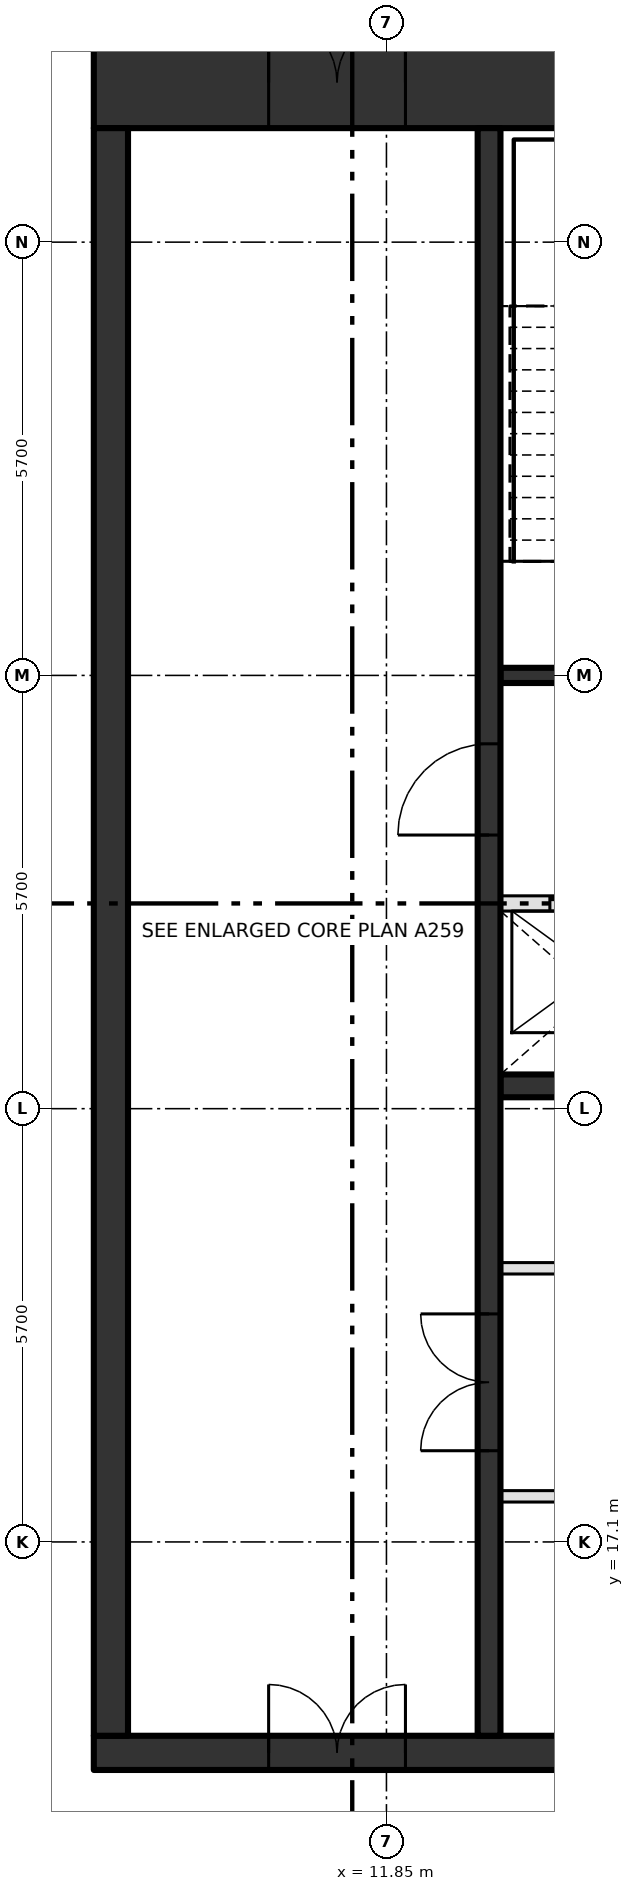
"""IFC4 building model, lengths in metres.
Left out: names, types, materials, properties, quantities, classifications, styles, units other than length and angle.
Written with IfcOpenShell. Run it as: python <this file> out.ifc"""

import sys

from ifc_helpers import new_model, si_unit, direction, frame, frame_2d, origin, place, context, subcontext, project, spatial, rectangle, extrude, element, fill, save


model = new_model("IFC4")
c1 = context("Model", 3, precision=1e-05, world=origin(), true_north=direction((0.0, 1.0)))
c2 = subcontext(c1, "Body", "Model", "MODEL_VIEW")
j1 = project(units=[si_unit("LENGTHUNIT", "METRE"), si_unit("PLANEANGLEUNIT", "RADIAN")], contexts=[c1])
p1 = place(None, origin())
s1 = spatial("IfcSite", under=j1, at=p1, CompositionType="ELEMENT")
p2 = place(p1, origin())
s2 = spatial("IfcBuilding", under=s1, at=p2, CompositionType="ELEMENT")
p3 = place(p2, frame((0.0, 0.0, 424.2)))
s3 = spatial("IfcBuildingStorey", under=s2, at=p3, CompositionType="ELEMENT", Elevation=424.2)
p4 = place(p3, frame((8.0, 14.325, -0.3), z_axis=(0.0, 0.0, 1.0), x_axis=(1.0, 0.0, 0.0)))
e1 = element("IfcWall", 1, at=p4, inside=s3, PredefinedType="SHEAR", context=c2, shape_type="SweptSolid", body=[
    extrude(rectangle(XDim=22.8, YDim=0.45, at=frame_2d((11.4, 0.0))), origin(), (0.0, 0.0, 1.0), 4.75),
])
p5 = place(p4, frame((2.3, 0.0, 0.3)))
e2 = element("IfcOpeningElement", 2, at=p5, cuts=e1, PredefinedType="OPENING", context=c2, shape_type="SweptSolid", body=[
    extrude(rectangle(XDim=1.8, YDim=2.1, at=frame_2d((0.9, 1.05))), frame((0.0, 0.235, 0.0), z_axis=(0.0, -1.0, 0.0), x_axis=(1.0, 0.0, 0.0)), (0.0, 0.0, 1.0), 0.47),
])
p6 = place(p3, frame((8.0, 36.3, -0.3), z_axis=(0.0, 0.0, 1.0), x_axis=(1.0, 0.0, 0.0)))
e3 = element("IfcWall", 3, at=p6, inside=s3, PredefinedType="SHEAR", context=c2, shape_type="SweptSolid", body=[
    extrude(rectangle(XDim=22.8, YDim=1.2, at=frame_2d((11.4, 0.0))), origin(), (0.0, 0.0, 1.0), 4.75),
])
p7 = place(p6, frame((2.3, 0.0, 0.3)))
e4 = element("IfcOpeningElement", 4, at=p7, cuts=e3, PredefinedType="OPENING", context=c2, shape_type="SweptSolid", body=[
    extrude(rectangle(XDim=1.8, YDim=2.1, at=frame_2d((0.9, 1.05))), frame((0.0, 0.61, 0.0), z_axis=(0.0, -1.0, 0.0), x_axis=(1.0, 0.0, 0.0)), (0.0, 0.0, 1.0), 1.22),
])
p8 = place(p3, frame((8.225, 14.55, -0.3), z_axis=(0.0, 0.0, 1.0), x_axis=(0.0, 1.0, 0.0)))
e5 = element("IfcWall", 5, at=p8, inside=s3, PredefinedType="SHEAR", context=c2, shape_type="SweptSolid", body=[
    extrude(rectangle(XDim=21.15, YDim=0.45, at=frame_2d((10.575, 0.0))), origin(), (0.0, 0.0, 1.0), 4.75),
])
p9 = place(p3, frame((13.35, 17.7, 0.0), z_axis=(0.0, 0.0, 1.0), x_axis=(1.0, 0.0, 0.0)))
e6 = element("IfcWall", 6, at=p9, inside=s3, PredefinedType="PARTITIONING", context=c2, shape_type="SweptSolid", body=[
    extrude(rectangle(XDim=13.425, YDim=0.15, at=frame_2d((6.712, 0.0))), origin(), (0.0, 0.0, 1.0), 4.45),
])
p10 = place(p9, frame((6.15, 0.0, 0.0)))
e7 = element("IfcOpeningElement", 7, at=p10, cuts=e6, PredefinedType="OPENING", context=c2, shape_type="SweptSolid", body=[
    extrude(rectangle(XDim=0.9, YDim=2.1, at=frame_2d((0.45, 1.05))), frame((0.0, 0.085, 0.0), z_axis=(0.0, -1.0, 0.0), x_axis=(1.0, 0.0, 0.0)), (0.0, 0.0, 1.0), 0.17),
])
p11 = place(p3, frame((13.35, 20.7, 0.0), z_axis=(0.0, 0.0, 1.0), x_axis=(1.0, 0.0, 0.0)))
e8 = element("IfcWall", 8, at=p11, inside=s3, PredefinedType="PARTITIONING", context=c2, shape_type="SweptSolid", body=[
    extrude(rectangle(XDim=13.425, YDim=0.15, at=frame_2d((6.712, 0.0))), origin(), (0.0, 0.0, 1.0), 4.45),
])
p12 = place(p11, frame((3.45, 0.0, 0.0)))
e9 = element("IfcOpeningElement", 9, at=p12, cuts=e8, PredefinedType="OPENING", context=c2, shape_type="SweptSolid", body=[
    extrude(rectangle(XDim=0.9, YDim=2.1, at=frame_2d((0.45, 1.05))), frame((0.0, 0.085, 0.0), z_axis=(0.0, -1.0, 0.0), x_axis=(1.0, 0.0, 0.0)), (0.0, 0.0, 1.0), 0.17),
])
p13 = place(p11, frame((10.2, 0.0, 0.0)))
e10 = element("IfcOpeningElement", 10, at=p13, cuts=e8, PredefinedType="OPENING", context=c2, shape_type="SweptSolid", body=[
    extrude(rectangle(XDim=0.9, YDim=2.1, at=frame_2d((0.45, 1.05))), frame((0.0, 0.085, 0.0), z_axis=(0.0, -1.0, 0.0), x_axis=(1.0, 0.0, 0.0)), (0.0, 0.0, 1.0), 0.17),
])
p14 = place(p3, frame((13.35, 23.1, 0.0), z_axis=(0.0, 0.0, 1.0), x_axis=(1.0, 0.0, 0.0)))
e11 = element("IfcWall", 11, at=p14, inside=s3, PredefinedType="SHEAR", context=c2, shape_type="SweptSolid", body=[
    extrude(rectangle(XDim=17.0, YDim=0.3, at=frame_2d((8.5, 0.0))), origin(), (0.0, 0.0, 1.0), 4.45),
])
p15 = place(p3, frame((13.35, 25.5, 0.0), z_axis=(0.0, 0.0, 1.0), x_axis=(1.0, 0.0, 0.0)))
e12 = element("IfcWall", 12, at=p15, inside=s3, PredefinedType="SOLIDWALL", context=c2, shape_type="SweptSolid", body=[
    extrude(rectangle(XDim=17.0, YDim=0.2, at=frame_2d((8.5, 0.0))), origin(), (0.0, 0.0, 1.0), 4.45),
])
p16 = place(p15, frame((0.65, 0.0, 0.0)))
e13 = element("IfcOpeningElement", 13, at=p16, cuts=e12, PredefinedType="OPENING", context=c2, shape_type="SweptSolid", body=[
    extrude(rectangle(XDim=1.1, YDim=2.1, at=frame_2d((0.55, 1.05))), frame((0.0, 0.11, 0.0), z_axis=(0.0, -1.0, 0.0), x_axis=(1.0, 0.0, 0.0)), (0.0, 0.0, 1.0), 0.22),
])
p17 = place(p15, frame((3.35, 0.0, 0.0)))
e14 = element("IfcOpeningElement", 14, at=p17, cuts=e12, PredefinedType="OPENING", context=c2, shape_type="SweptSolid", body=[
    extrude(rectangle(XDim=1.1, YDim=2.1, at=frame_2d((0.55, 1.05))), frame((0.0, 0.11, 0.0), z_axis=(0.0, -1.0, 0.0), x_axis=(1.0, 0.0, 0.0)), (0.0, 0.0, 1.0), 0.22),
])
p18 = place(p15, frame((6.05, 0.0, 0.0)))
e15 = element("IfcOpeningElement", 15, at=p18, cuts=e12, PredefinedType="OPENING", context=c2, shape_type="SweptSolid", body=[
    extrude(rectangle(XDim=1.1, YDim=2.1, at=frame_2d((0.55, 1.05))), frame((0.0, 0.11, 0.0), z_axis=(0.0, -1.0, 0.0), x_axis=(1.0, 0.0, 0.0)), (0.0, 0.0, 1.0), 0.22),
])
p19 = place(p15, frame((8.75, 0.0, 0.0)))
e16 = element("IfcOpeningElement", 16, at=p19, cuts=e12, PredefinedType="OPENING", context=c2, shape_type="SweptSolid", body=[
    extrude(rectangle(XDim=1.1, YDim=2.1, at=frame_2d((0.55, 1.05))), frame((0.0, 0.11, 0.0), z_axis=(0.0, -1.0, 0.0), x_axis=(1.0, 0.0, 0.0)), (0.0, 0.0, 1.0), 0.22),
])
p20 = place(p15, frame((13.0, 0.0, 0.0)))
e17 = element("IfcOpeningElement", 17, at=p20, cuts=e12, PredefinedType="OPENING", context=c2, shape_type="SweptSolid", body=[
    extrude(rectangle(XDim=0.9, YDim=2.1, at=frame_2d((0.45, 1.05))), frame((0.0, 0.11, 0.0), z_axis=(0.0, -1.0, 0.0), x_axis=(1.0, 0.0, 0.0)), (0.0, 0.0, 1.0), 0.22),
])
p21 = place(p3, frame((13.35, 28.5, 0.0), z_axis=(0.0, 0.0, 1.0), x_axis=(1.0, 0.0, 0.0)))
e18 = element("IfcWall", 18, at=p21, inside=s3, PredefinedType="SOLIDWALL", context=c2, shape_type="SweptSolid", body=[
    extrude(rectangle(XDim=6.75, YDim=0.2, at=frame_2d((3.375, 0.0))), origin(), (0.0, 0.0, 1.0), 4.45),
])
p22 = place(p21, frame((0.95, 0.0, 0.0)))
e19 = element("IfcOpeningElement", 19, at=p22, cuts=e18, PredefinedType="OPENING", context=c2, shape_type="SweptSolid", body=[
    extrude(rectangle(XDim=1.2, YDim=2.1, at=frame_2d((0.6, 1.05))), frame((0.0, 0.11, 0.0), z_axis=(0.0, -1.0, 0.0), x_axis=(1.0, 0.0, 0.0)), (0.0, 0.0, 1.0), 0.22),
])
p23 = place(p21, frame((3.75, 0.0, 0.0)))
e20 = element("IfcOpeningElement", 20, at=p23, cuts=e18, PredefinedType="OPENING", context=c2, shape_type="SweptSolid", body=[
    extrude(rectangle(XDim=1.1, YDim=2.1, at=frame_2d((0.55, 1.05))), frame((0.0, 0.11, 0.0), z_axis=(0.0, -1.0, 0.0), x_axis=(1.0, 0.0, 0.0)), (0.0, 0.0, 1.0), 0.22),
])
p24 = place(p3, frame((13.2, 14.55, 0.0), z_axis=(0.0, 0.0, 1.0), x_axis=(0.0, 1.0, 0.0)))
e21 = element("IfcWall", 21, at=p24, inside=s3, PredefinedType="SHEAR", context=c2, shape_type="SweptSolid", body=[
    extrude(rectangle(XDim=21.15, YDim=0.3, at=frame_2d((10.575, 0.0))), origin(), (0.0, 0.0, 1.0), 4.45),
])
p25 = place(p24, frame((3.75, 0.0, 0.0)))
e22 = element("IfcOpeningElement", 22, at=p25, cuts=e21, PredefinedType="OPENING", context=c2, shape_type="SweptSolid", body=[
    extrude(rectangle(XDim=1.8, YDim=2.1, at=frame_2d((0.9, 1.05))), frame((0.0, 0.16, 0.0), z_axis=(0.0, -1.0, 0.0), x_axis=(1.0, 0.0, 0.0)), (0.0, 0.0, 1.0), 0.32),
])
p26 = place(p24, frame((11.85, 0.0, 0.0)))
e23 = element("IfcOpeningElement", 23, at=p26, cuts=e21, PredefinedType="OPENING", context=c2, shape_type="SweptSolid", body=[
    extrude(rectangle(XDim=1.2, YDim=2.1, at=frame_2d((0.6, 1.05))), frame((0.0, 0.16, 0.0), z_axis=(0.0, -1.0, 0.0), x_axis=(1.0, 0.0, 0.0)), (0.0, 0.0, 1.0), 0.32),
])
p27 = place(p16, origin())
e24 = element("IfcDoor", 24, at=p27, inside=s3, OperationType="SLIDING_TO_LEFT", PredefinedType="DOOR", context=c2, shape_type="SweptSolid", body=[
    extrude(rectangle(XDim=1.1, YDim=2.1, at=frame_2d((0.55, 1.05))), frame((0.0, 0.025, 0.0), z_axis=(0.0, -1.0, 0.0), x_axis=(1.0, 0.0, 0.0)), (0.0, 0.0, 1.0), 0.05),
])
fill(e13, e24)
p28 = place(p25, origin())
e25 = element("IfcDoor", 25, at=p28, inside=s3, OperationType="DOUBLE_DOOR_SINGLE_SWING", PredefinedType="DOOR", context=c2, shape_type="SweptSolid", body=[
    extrude(rectangle(XDim=1.8, YDim=2.1, at=frame_2d((0.9, 1.05))), frame((0.0, 0.025, 0.0), z_axis=(0.0, -1.0, 0.0), x_axis=(1.0, 0.0, 0.0)), (0.0, 0.0, 1.0), 0.05),
])
fill(e22, e25)
p29 = place(p26, origin())
e26 = element("IfcDoor", 26, at=p29, inside=s3, OperationType="SINGLE_SWING_LEFT", PredefinedType="DOOR", context=c2, shape_type="SweptSolid", body=[
    extrude(rectangle(XDim=1.2, YDim=2.1, at=frame_2d((0.6, 1.05))), frame((0.0, 0.025, 0.0), z_axis=(0.0, -1.0, 0.0), x_axis=(1.0, 0.0, 0.0)), (0.0, 0.0, 1.0), 0.05),
])
fill(e23, e26)
p30 = place(p7, origin())
e27 = element("IfcDoor", 27, at=p30, inside=s3, OperationType="DOUBLE_DOOR_SINGLE_SWING", PredefinedType="DOOR", context=c2, shape_type="SweptSolid", body=[
    extrude(rectangle(XDim=1.8, YDim=2.1, at=frame_2d((0.9, 1.05))), frame((0.0, 0.025, 0.0), z_axis=(0.0, -1.0, 0.0), x_axis=(1.0, 0.0, 0.0)), (0.0, 0.0, 1.0), 0.05),
])
fill(e4, e27)
p31 = place(p5, origin())
e28 = element("IfcDoor", 28, at=p31, inside=s3, OperationType="DOUBLE_DOOR_SINGLE_SWING", PredefinedType="DOOR", context=c2, shape_type="SweptSolid", body=[
    extrude(rectangle(XDim=1.8, YDim=2.1, at=frame_2d((0.9, 1.05))), frame((0.0, 0.025, 0.0), z_axis=(0.0, -1.0, 0.0), x_axis=(1.0, 0.0, 0.0)), (0.0, 0.0, 1.0), 0.05),
])
fill(e2, e28)
save(model, sys.argv[1])
